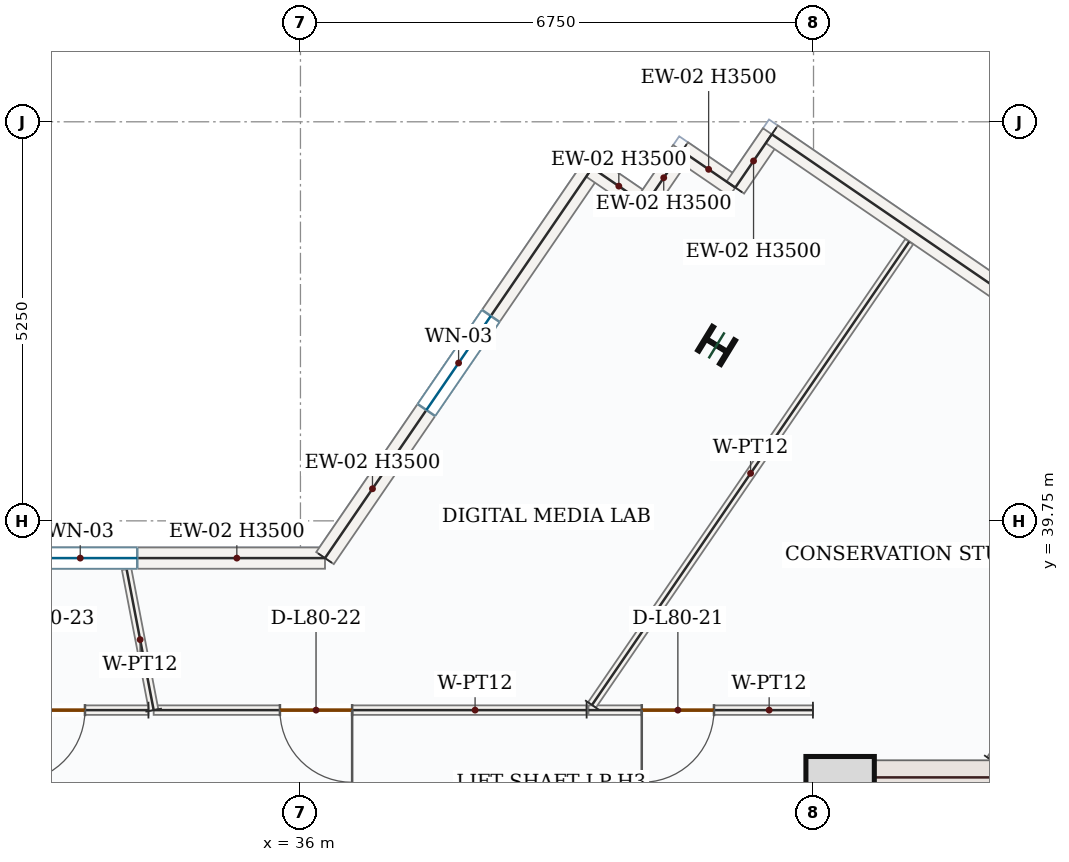
"""IFC4 building model, lengths in metres.
Left out: names, types, materials, properties, quantities, classifications, styles, units other than length and angle.
Written with IfcOpenShell. Run it as: python <this file> out.ifc"""

import sys

from ifc_helpers import new_model, si_unit, direction, frame, frame_2d, origin, origin_2d, place, context, subcontext, project, spatial, rectangle, i_section, extrude, source, transform, mapped, element, fill, save


model = new_model("IFC4")
c1 = context("Model", 3, precision=1e-05, world=origin(), true_north=direction((0.0, 1.0)))
c2 = subcontext(c1, "Body", "Model", "MODEL_VIEW")
j1 = project(units=[si_unit("LENGTHUNIT", "METRE"), si_unit("PLANEANGLEUNIT", "RADIAN")], contexts=[c1])
p1 = place(None, origin())
s1 = spatial("IfcSite", under=j1, at=p1, CompositionType="ELEMENT")
p2 = place(p1, origin())
s2 = spatial("IfcBuilding", under=s1, at=p2, CompositionType="ELEMENT")
p3 = place(p2, frame((0.0, 0.0, 331.05)))
s3 = spatial("IfcBuildingStorey", under=s2, at=p3, CompositionType="ELEMENT", Elevation=331.05)
p4 = place(p3, frame((42.975, 28.05, 0.0), z_axis=(0.0, 0.0, 1.0), x_axis=(0.0, 1.0, 0.0)))
e1 = element("IfcWall", 1, at=p4, inside=s3, PredefinedType="SHEAR", context=c2, shape_type="SweptSolid", body=[
    extrude(rectangle(XDim=8.55, YDim=0.45, at=frame_2d((4.275, 0.0))), origin(), (0.0, 0.0, 1.0), 3.5),
])
p5 = place(p4, frame((1.5, 0.0, 0.0)))
e2 = element("IfcOpeningElement", 2, at=p5, cuts=e1, PredefinedType="OPENING", context=c2, shape_type="SweptSolid", body=[
    extrude(rectangle(XDim=1.1, YDim=2.2, at=frame_2d((0.55, 1.1))), frame((0.0, 0.235, 0.0), z_axis=(0.0, -1.0, 0.0), x_axis=(1.0, 0.0, 0.0)), (0.0, 0.0, 1.0), 0.47),
])
m1 = source(origin(), c2, "Body", "SweptSolid", [
    extrude(rectangle(XDim=7.1, YDim=0.45, at=frame_2d((3.55, 0.0))), origin(), (0.0, 0.0, 1.0), 3.5),
])
p6 = place(p3, frame((43.2, 36.375, 0.0), z_axis=(0.0, 0.0, 1.0), x_axis=(1.0, 0.0, 0.0)))
e3 = element("IfcWall", 3, at=p6, inside=s3, PredefinedType="SHEAR", context=c2, shape_type="MappedRepresentation", body=[
    mapped(m1, transform((0.0, 0.0, 0.0), x_axis=(1.0, 0.0, 0.0), y_axis=(0.0, 1.0, 0.0), z_axis=(0.0, 0.0, 1.0), scale=1.0)),
])
m2 = source(origin(), c2, "Body", "SweptSolid", [
    extrude(rectangle(XDim=0.9, YDim=0.9, at=origin_2d()), origin(), (0.0, 0.0, 1.0), 3.75),
])
p7 = place(p3, frame((43.1, 36.2, 0.0), z_axis=(0.0, 0.0, 1.0), x_axis=(1.0, 0.0, 0.0)))
e4 = element("IfcColumn", 4, at=p7, inside=s3, PredefinedType="COLUMN", context=c2, shape_type="MappedRepresentation", body=[
    mapped(m2, transform((0.0, 0.0, 0.0), x_axis=(1.0, 0.0, 0.0), y_axis=(0.0, 1.0, 0.0), z_axis=(0.0, 0.0, 1.0), scale=1.0)),
])
m3 = source(origin(), c2, "Body", "SweptSolid", [
    extrude(i_section(OverallWidth=0.369, OverallDepth=0.356, WebThickness=0.011, FlangeThickness=0.018, FilletRadius=0.018, at=origin_2d()), origin(), (0.0, 0.0, 1.0), 3.75),
])
p8 = place(p3, frame((41.475, 42.058, 0.0), z_axis=(0.0, 0.0, 1.0), x_axis=(0.522498564716, 0.852640164354, 0.0)))
e5 = element("IfcColumn", 5, at=p8, inside=s3, PredefinedType="COLUMN", context=c2, shape_type="MappedRepresentation", body=[
    mapped(m3, transform((0.0, 0.0, 0.0), x_axis=(1.0, 0.0, 0.0), y_axis=(0.0, 1.0, 0.0), z_axis=(0.0, 0.0, 1.0), scale=1.0)),
])
p9 = place(p3, frame((29.883, 39.26, 0.0), z_axis=(0.0, 0.0, 1.0), x_axis=(1.0, 0.0, 0.0)))
e6 = element("IfcWall", 6, at=p9, inside=s3, PredefinedType="SOLIDWALL", context=c2, shape_type="SweptSolid", body=[
    extrude(rectangle(XDim=6.44, YDim=0.28, at=frame_2d((3.22, 0.0))), origin(), (0.0, 0.0, 1.0), 3.5),
])
p10 = place(p9, frame((2.47, 0.0, 0.85)))
e7 = element("IfcOpeningElement", 7, at=p10, cuts=e6, PredefinedType="OPENING", context=c2, shape_type="SweptSolid", body=[
    extrude(rectangle(XDim=1.5, YDim=1.5, at=frame_2d((0.75, 0.75))), frame((0.0, 0.15, 0.0), z_axis=(0.0, -1.0, 0.0), x_axis=(1.0, 0.0, 0.0)), (0.0, 0.0, 1.0), 0.3),
])
p11 = place(p3, frame((36.323, 39.26, 0.0), z_axis=(0.0, 0.0, 1.0), x_axis=(0.564953982519, 0.825122413728, 0.0)))
e8 = element("IfcWall", 8, at=p11, inside=s3, PredefinedType="SOLIDWALL", context=c2, shape_type="SweptSolid", body=[
    extrude(rectangle(XDim=6.221, YDim=0.28, at=frame_2d((3.111, 0.0))), origin(), (0.0, 0.0, 1.0), 3.5),
])
p12 = place(p11, frame((2.361, 0.0, 0.85)))
e9 = element("IfcOpeningElement", 9, at=p12, cuts=e8, PredefinedType="OPENING", context=c2, shape_type="SweptSolid", body=[
    extrude(rectangle(XDim=1.5, YDim=1.5, at=frame_2d((0.75, 0.75))), frame((0.0, 0.15, 0.0), z_axis=(0.0, -1.0, 0.0), x_axis=(1.0, 0.0, 0.0)), (0.0, 0.0, 1.0), 0.3),
])
m4 = source(origin(), c2, "Body", "SweptSolid", [
    extrude(rectangle(XDim=0.85, YDim=0.28, at=frame_2d((0.425, 0.0))), origin(), (0.0, 0.0, 1.0), 3.5),
])
for number, where, z_axis, x_axis in (
    (10, (39.838, 44.394, 0.0), (0.0, 0.0, 1.0), (0.825, -0.565, 0.0)),
    (11, (40.539, 43.913, 0.0), (0.0, 0.0, 1.0), (0.565, 0.825, 0.0)),
    (12, (41.02, 44.615, 0.0), (0.0, 0.0, 1.0), (0.825, -0.565, 0.0)),
):
    element("IfcWall", number, at=place(p3, frame(where, z_axis=z_axis, x_axis=x_axis)), inside=s3, PredefinedType="SOLIDWALL", context=c2, shape_type="MappedRepresentation", body=[
        mapped(m4, transform((0.0, 0.0, 0.0), x_axis=(1.0, 0.0, 0.0), y_axis=(0.0, 1.0, 0.0), z_axis=(0.0, 0.0, 1.0), scale=1.0)),
    ])
m5 = source(origin(), c2, "Body", "SweptSolid", [
    extrude(rectangle(XDim=0.85, YDim=0.28, at=frame_2d((0.425, 0.0))), origin(), (0.0, 0.0, 1.0), 3.5),
])
p13 = place(p3, frame((41.721, 44.135, 0.0), z_axis=(0.0, 0.0, 1.0), x_axis=(0.565064897913, 0.825046459993, 0.0)))
e13 = element("IfcWall", 13, at=p13, inside=s3, PredefinedType="SOLIDWALL", context=c2, shape_type="MappedRepresentation", body=[
    mapped(m5, transform((0.0, 0.0, 0.0), x_axis=(1.0, 0.0, 0.0), y_axis=(0.0, 1.0, 0.0), z_axis=(0.0, 0.0, 1.0), scale=1.0)),
])
p14 = place(p3, frame((42.201, 44.836, 0.0), z_axis=(0.0, 0.0, 1.0), x_axis=(0.825121888295, -0.56495474992, 0.0)))
e14 = element("IfcWall", 14, at=p14, inside=s3, PredefinedType="SOLIDWALL", context=c2, shape_type="SweptSolid", body=[
    extrude(rectangle(XDim=9.92, YDim=0.28, at=frame_2d((4.96, 0.0))), origin(), (0.0, 0.0, 1.0), 3.5),
])
p15 = place(p14, frame((4.21, 0.0, 0.85)))
e15 = element("IfcOpeningElement", 15, at=p15, cuts=e14, PredefinedType="OPENING", context=c2, shape_type="SweptSolid", body=[
    extrude(rectangle(XDim=1.5, YDim=1.5, at=frame_2d((0.75, 0.75))), frame((0.0, 0.15, 0.0), z_axis=(0.0, -1.0, 0.0), x_axis=(1.0, 0.0, 0.0)), (0.0, 0.0, 1.0), 0.3),
])
m6 = source(origin(), c2, "Body", "SweptSolid", [
    extrude(rectangle(XDim=2.511, YDim=0.125, at=frame_2d((1.255, 0.0))), origin(), (0.0, 0.0, 1.0), 3.5),
])
p16 = place(p3, frame((45.085, 36.605, 0.0), z_axis=(0.0, 0.0, 1.0), x_axis=(0.564980194272, 0.825104466162, 0.0)))
e16 = element("IfcWall", 16, at=p16, inside=s3, PredefinedType="PARTITIONING", context=c2, shape_type="MappedRepresentation", body=[
    mapped(m6, transform((0.0, 0.0, 0.0), x_axis=(1.0, 0.0, 0.0), y_axis=(0.0, 1.0, 0.0), z_axis=(0.0, 0.0, 1.0), scale=1.0)),
])
p17 = place(p3, frame((42.742, 37.26, 0.0), z_axis=(0.0, 0.0, 1.0), x_axis=(-0.999999996583, 8.2671957e-05, 0.0)))
e17 = element("IfcWall", 17, at=p17, inside=s3, PredefinedType="PARTITIONING", context=c2, shape_type="SweptSolid", body=[
    extrude(rectangle(XDim=2.953, YDim=0.125, at=frame_2d((1.477, 0.0))), origin(), (0.0, 0.0, 1.0), 3.5),
])
p18 = place(p17, frame((1.302, 0.0, 0.0)))
e18 = element("IfcOpeningElement", 18, at=p18, cuts=e17, PredefinedType="OPENING", context=c2, shape_type="SweptSolid", body=[
    extrude(rectangle(XDim=0.95, YDim=2.15, at=frame_2d((0.475, 1.075))), frame((0.0, 0.073, 0.0), z_axis=(0.0, -1.0, 0.0), x_axis=(1.0, 0.0, 0.0)), (0.0, 0.0, 1.0), 0.145),
])
m7 = source(origin(), c2, "Body", "SweptSolid", [
    extrude(rectangle(XDim=7.387, YDim=0.125, at=frame_2d((3.693, 0.0))), origin(), (0.0, 0.0, 1.0), 3.5),
])
p19 = place(p3, frame((39.835, 37.327, 0.0), z_axis=(0.0, 0.0, 1.0), x_axis=(0.564969427755, 0.8251118383, 0.0)))
e19 = element("IfcWall", 19, at=p19, inside=s3, PredefinedType="PARTITIONING", context=c2, shape_type="MappedRepresentation", body=[
    mapped(m7, transform((0.0, 0.0, 0.0), x_axis=(1.0, 0.0, 0.0), y_axis=(0.0, 1.0, 0.0), z_axis=(0.0, 0.0, 1.0), scale=1.0)),
])
p20 = place(p3, frame((39.765, 37.26, 0.0), z_axis=(0.0, 0.0, 1.0), x_axis=(-1.0, 0.0, 0.0)))
e20 = element("IfcWall", 20, at=p20, inside=s3, PredefinedType="PARTITIONING", context=c2, shape_type="SweptSolid", body=[
    extrude(rectangle(XDim=5.696, YDim=0.125, at=frame_2d((2.848, 0.0))), origin(), (0.0, 0.0, 1.0), 3.5),
])
p21 = place(p20, frame((3.085, 0.0, 0.0)))
e21 = element("IfcOpeningElement", 21, at=p21, cuts=e20, PredefinedType="OPENING", context=c2, shape_type="SweptSolid", body=[
    extrude(rectangle(XDim=0.95, YDim=2.15, at=frame_2d((0.475, 1.075))), frame((0.0, 0.073, 0.0), z_axis=(0.0, -1.0, 0.0), x_axis=(1.0, 0.0, 0.0)), (0.0, 0.0, 1.0), 0.145),
])
m8 = source(origin(), c2, "Body", "SweptSolid", [
    extrude(rectangle(XDim=1.889, YDim=0.125, at=frame_2d((0.944, 0.0))), origin(), (0.0, 0.0, 1.0), 3.5),
])
p22 = place(p3, frame((34.069, 37.26, 0.0), z_axis=(0.0, 0.0, 1.0), x_axis=(-0.188454265316, 0.982081966989, 0.0)))
e22 = element("IfcWall", 22, at=p22, inside=s3, PredefinedType="PARTITIONING", context=c2, shape_type="MappedRepresentation", body=[
    mapped(m8, transform((0.0, 0.0, 0.0), x_axis=(1.0, 0.0, 0.0), y_axis=(0.0, 1.0, 0.0), z_axis=(0.0, 0.0, 1.0), scale=1.0)),
])
p23 = place(p3, frame((34.0, 37.26, 0.0), z_axis=(0.0, 0.0, 1.0), x_axis=(-0.999999994709, -0.000102870075, 0.0)))
e23 = element("IfcWall", 23, at=p23, inside=s3, PredefinedType="PARTITIONING", context=c2, shape_type="SweptSolid", body=[
    extrude(rectangle(XDim=4.747, YDim=0.125, at=frame_2d((2.373, 0.0))), origin(), (0.0, 0.0, 1.0), 3.5),
])
p24 = place(p23, frame((0.835, 0.0, 0.0)))
e24 = element("IfcOpeningElement", 24, at=p24, cuts=e23, PredefinedType="OPENING", context=c2, shape_type="SweptSolid", body=[
    extrude(rectangle(XDim=0.95, YDim=2.15, at=frame_2d((0.475, 1.075))), frame((0.0, 0.073, 0.0), z_axis=(0.0, -1.0, 0.0), x_axis=(1.0, 0.0, 0.0)), (0.0, 0.0, 1.0), 0.145),
])
m9 = source(origin(), c2, "Body", "SweptSolid", [
    extrude(rectangle(XDim=1.5, YDim=1.5, at=frame_2d((0.75, 0.75))), frame((0.0, 0.03, 0.0), z_axis=(0.0, -1.0, 0.0), x_axis=(1.0, 0.0, 0.0)), (0.0, 0.0, 1.0), 0.06),
])
p25 = place(p10, origin())
e25 = element("IfcWindow", 25, at=p25, inside=s3, PartitioningType="SINGLE_PANEL", PredefinedType="WINDOW", context=c2, shape_type="MappedRepresentation", body=[
    mapped(m9, transform((0.0, 0.0, 0.0), x_axis=(1.0, 0.0, 0.0), y_axis=(0.0, 1.0, 0.0), z_axis=(0.0, 0.0, 1.0), scale=1.0)),
])
fill(e7, e25)
p26 = place(p12, origin())
e26 = element("IfcWindow", 26, at=p26, inside=s3, PartitioningType="SINGLE_PANEL", PredefinedType="WINDOW", context=c2, shape_type="MappedRepresentation", body=[
    mapped(m9, transform((0.0, 0.0, 0.0), x_axis=(1.0, 0.0, 0.0), y_axis=(0.0, 1.0, 0.0), z_axis=(0.0, 0.0, 1.0), scale=1.0)),
])
fill(e9, e26)
m10 = source(origin(), c2, "Body", "SweptSolid", [
    extrude(rectangle(XDim=0.95, YDim=2.15, at=frame_2d((0.475, 1.075))), frame((0.0, 0.025, 0.0), z_axis=(0.0, -1.0, 0.0), x_axis=(1.0, 0.0, 0.0)), (0.0, 0.0, 1.0), 0.05),
])
p27 = place(p18, origin())
e27 = element("IfcDoor", 27, at=p27, inside=s3, OperationType="SINGLE_SWING_RIGHT", PredefinedType="DOOR", context=c2, shape_type="MappedRepresentation", body=[
    mapped(m10, transform((0.0, 0.0, 0.0), x_axis=(1.0, 0.0, 0.0), y_axis=(0.0, 1.0, 0.0), z_axis=(0.0, 0.0, 1.0), scale=1.0)),
])
fill(e18, e27)
p28 = place(p21, origin())
e28 = element("IfcDoor", 28, at=p28, inside=s3, OperationType="SINGLE_SWING_LEFT", PredefinedType="DOOR", context=c2, shape_type="MappedRepresentation", body=[
    mapped(m10, transform((0.0, 0.0, 0.0), x_axis=(1.0, 0.0, 0.0), y_axis=(0.0, 1.0, 0.0), z_axis=(0.0, 0.0, 1.0), scale=1.0)),
])
fill(e21, e28)
p29 = place(p24, origin())
e29 = element("IfcDoor", 29, at=p29, inside=s3, OperationType="SINGLE_SWING_RIGHT", PredefinedType="DOOR", context=c2, shape_type="MappedRepresentation", body=[
    mapped(m10, transform((0.0, 0.0, 0.0), x_axis=(1.0, 0.0, 0.0), y_axis=(0.0, 1.0, 0.0), z_axis=(0.0, 0.0, 1.0), scale=1.0)),
])
fill(e24, e29)
save(model, sys.argv[1])
